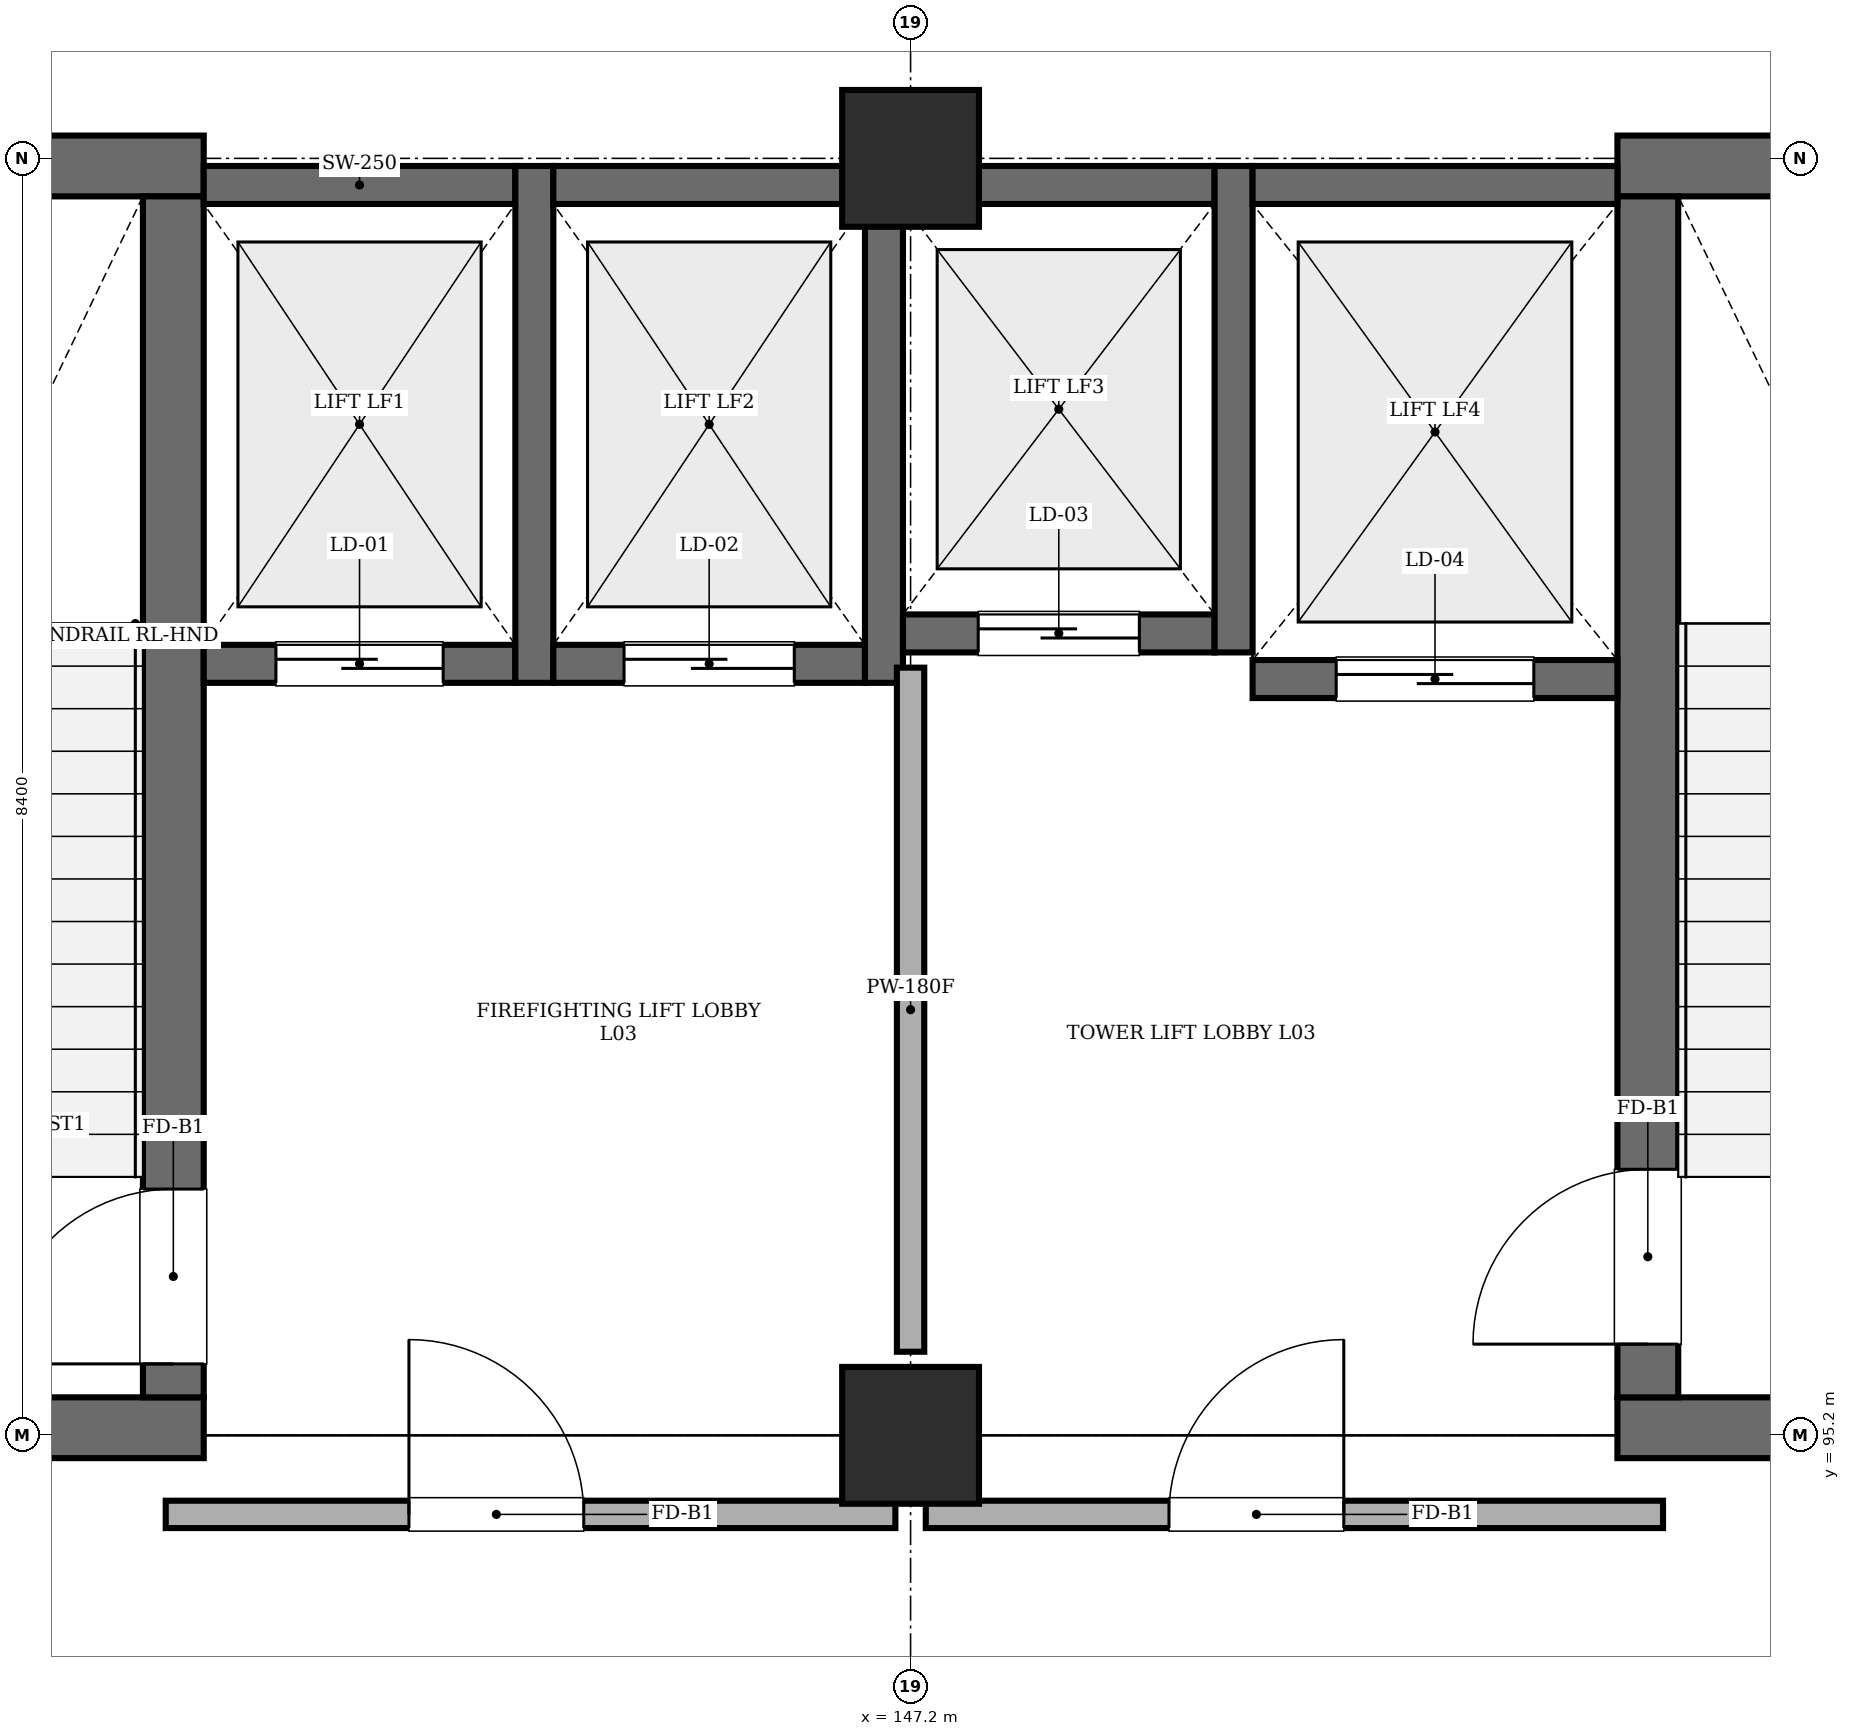
"""IFC4 building model, lengths in metres.
Left out: names, types, materials, properties, quantities, classifications, styles, units other than length and angle.
Written with IfcOpenShell. Run it as: python <this file> out.ifc"""

import sys

from ifc_helpers import new_model, si_unit, direction, frame, frame_2d, origin, origin_2d, place, context, subcontext, project, spatial, rectangle, extrude, element, fill, save


model = new_model("IFC4")
c1 = context("Model", 3, precision=1e-05, world=origin(), true_north=direction((0.0, 1.0)))
c2 = subcontext(c1, "Body", "Model", "MODEL_VIEW")
j1 = project(units=[si_unit("LENGTHUNIT", "METRE"), si_unit("PLANEANGLEUNIT", "RADIAN")], contexts=[c1])
p1 = place(None, origin())
s1 = spatial("IfcSite", under=j1, at=p1, CompositionType="ELEMENT")
p2 = place(p1, origin())
s2 = spatial("IfcBuilding", under=s1, at=p2, CompositionType="ELEMENT")
p3 = place(p2, frame((0.0, 0.0, 10.2)))
s3 = spatial("IfcBuildingStorey", under=s2, at=p3, CompositionType="ELEMENT", Elevation=10.2)
for number, where, z_axis, x_axis in (
    (1, (147.2, 95.2, 0.0), (0.0, 0.0, 1.0), (1.0, 0.0, 0.0)),
    (2, (147.2, 103.6, 0.0), (0.0, 0.0, 1.0), (1.0, 0.0, 0.0)),
):
    element("IfcColumn", number, at=place(p3, frame(where, z_axis=z_axis, x_axis=x_axis)), inside=s3, PredefinedType="COLUMN", context=c2, shape_type="SweptSolid", body=[
        extrude(rectangle(XDim=0.9, YDim=0.9, at=origin_2d()), origin(), (0.0, 0.0, 1.0), 4.26),
    ])
for number, where, z_axis, x_axis in (
    (3, (138.65, 95.25, 0.0), (0.0, 0.0, 1.0), (1.0, 0.0, 0.0)),
    (4, (138.65, 103.55, 0.0), (0.0, 0.0, 1.0), (1.0, 0.0, 0.0)),
):
    element("IfcWall", number, at=place(p3, frame(where, z_axis=z_axis, x_axis=x_axis)), inside=s3, PredefinedType="SHEAR", context=c2, shape_type="SweptSolid", body=[
        extrude(rectangle(XDim=3.9, YDim=0.4, at=frame_2d((1.95, 0.0))), origin(), (0.0, 0.0, 1.0), 4.26),
    ])
p4 = place(p3, frame((142.35, 95.45, 0.0), z_axis=(0.0, 0.0, 1.0), x_axis=(0.0, 1.0, 0.0)))
e5 = element("IfcWall", 5, at=p4, inside=s3, PredefinedType="SHEAR", context=c2, shape_type="SweptSolid", body=[
    extrude(rectangle(XDim=7.9, YDim=0.4, at=frame_2d((3.95, 0.0))), origin(), (0.0, 0.0, 1.0), 4.26),
])
p5 = place(p4, frame((0.22, 0.0, 0.0)))
e6 = element("IfcOpeningElement", 6, at=p5, cuts=e5, PredefinedType="OPENING", context=c2, shape_type="SweptSolid", body=[
    extrude(rectangle(XDim=1.15, YDim=2.15, at=frame_2d((0.575, 1.075))), frame((0.0, 0.21, 0.0), z_axis=(0.0, -1.0, 0.0), x_axis=(1.0, 0.0, 0.0)), (0.0, 0.0, 1.0), 0.42),
])
for number, where, z_axis, x_axis in (
    (7, (151.85, 95.25, 0.0), (0.0, 0.0, 1.0), (1.0, 0.0, 0.0)),
    (8, (151.85, 103.55, 0.0), (0.0, 0.0, 1.0), (1.0, 0.0, 0.0)),
):
    element("IfcWall", number, at=place(p3, frame(where, z_axis=z_axis, x_axis=x_axis)), inside=s3, PredefinedType="SHEAR", context=c2, shape_type="SweptSolid", body=[
        extrude(rectangle(XDim=3.9, YDim=0.4, at=frame_2d((1.95, 0.0))), origin(), (0.0, 0.0, 1.0), 4.26),
    ])
p6 = place(p3, frame((152.05, 95.45, 0.0), z_axis=(0.0, 0.0, 1.0), x_axis=(0.0, 1.0, 0.0)))
e9 = element("IfcWall", 9, at=p6, inside=s3, PredefinedType="SHEAR", context=c2, shape_type="SweptSolid", body=[
    extrude(rectangle(XDim=7.9, YDim=0.4, at=frame_2d((3.95, 0.0))), origin(), (0.0, 0.0, 1.0), 4.26),
])
p7 = place(p6, frame((0.35, 0.0, 0.0)))
e10 = element("IfcOpeningElement", 10, at=p7, cuts=e9, PredefinedType="OPENING", context=c2, shape_type="SweptSolid", body=[
    extrude(rectangle(XDim=1.15, YDim=2.15, at=frame_2d((0.575, 1.075))), frame((0.0, 0.21, 0.0), z_axis=(0.0, -1.0, 0.0), x_axis=(1.0, 0.0, 0.0)), (0.0, 0.0, 1.0), 0.42),
])
p8 = place(p3, frame((142.55, 100.275, 0.0), z_axis=(0.0, 0.0, 1.0), x_axis=(1.0, 0.0, 0.0)))
e11 = element("IfcWall", 11, at=p8, inside=s3, PredefinedType="SHEAR", context=c2, shape_type="SweptSolid", body=[
    extrude(rectangle(XDim=2.05, YDim=0.25, at=frame_2d((1.025, 0.0))), origin(), (0.0, 0.0, 1.0), 4.26),
])
p9 = place(p8, frame((0.475, 0.0, 0.0)))
e12 = element("IfcOpeningElement", 12, at=p9, cuts=e11, PredefinedType="OPENING", context=c2, shape_type="SweptSolid", body=[
    extrude(rectangle(XDim=1.1, YDim=2.15, at=frame_2d((0.55, 1.075))), frame((0.0, 0.135, 0.0), z_axis=(0.0, -1.0, 0.0), x_axis=(1.0, 0.0, 0.0)), (0.0, 0.0, 1.0), 0.27),
])
p10 = place(p3, frame((142.55, 103.425, 0.0), z_axis=(0.0, 0.0, 1.0), x_axis=(1.0, 0.0, 0.0)))
e13 = element("IfcWall", 13, at=p10, inside=s3, PredefinedType="SHEAR", context=c2, shape_type="SweptSolid", body=[
    extrude(rectangle(XDim=2.05, YDim=0.25, at=frame_2d((1.025, 0.0))), origin(), (0.0, 0.0, 1.0), 4.26),
])
p11 = place(p3, frame((144.725, 100.15, 0.0), z_axis=(0.0, 0.0, 1.0), x_axis=(0.0, 1.0, 0.0)))
e14 = element("IfcWall", 14, at=p11, inside=s3, PredefinedType="SHEAR", context=c2, shape_type="SweptSolid", body=[
    extrude(rectangle(XDim=3.4, YDim=0.25, at=frame_2d((1.7, 0.0))), origin(), (0.0, 0.0, 1.0), 4.26),
])
p12 = place(p3, frame((144.85, 100.275, 0.0), z_axis=(0.0, 0.0, 1.0), x_axis=(1.0, 0.0, 0.0)))
e15 = element("IfcWall", 15, at=p12, inside=s3, PredefinedType="SHEAR", context=c2, shape_type="SweptSolid", body=[
    extrude(rectangle(XDim=2.05, YDim=0.25, at=frame_2d((1.025, 0.0))), origin(), (0.0, 0.0, 1.0), 4.26),
])
p13 = place(p12, frame((0.465, 0.0, 0.0)))
e16 = element("IfcOpeningElement", 16, at=p13, cuts=e15, PredefinedType="OPENING", context=c2, shape_type="SweptSolid", body=[
    extrude(rectangle(XDim=1.12, YDim=2.15, at=frame_2d((0.56, 1.075))), frame((0.0, 0.135, 0.0), z_axis=(0.0, -1.0, 0.0), x_axis=(1.0, 0.0, 0.0)), (0.0, 0.0, 1.0), 0.27),
])
p14 = place(p3, frame((144.85, 103.425, 0.0), z_axis=(0.0, 0.0, 1.0), x_axis=(1.0, 0.0, 0.0)))
e17 = element("IfcWall", 17, at=p14, inside=s3, PredefinedType="SHEAR", context=c2, shape_type="SweptSolid", body=[
    extrude(rectangle(XDim=2.05, YDim=0.25, at=frame_2d((1.025, 0.0))), origin(), (0.0, 0.0, 1.0), 4.26),
])
p15 = place(p3, frame((147.025, 100.15, 0.0), z_axis=(0.0, 0.0, 1.0), x_axis=(0.0, 1.0, 0.0)))
e18 = element("IfcWall", 18, at=p15, inside=s3, PredefinedType="SHEAR", context=c2, shape_type="SweptSolid", body=[
    extrude(rectangle(XDim=3.4, YDim=0.25, at=frame_2d((1.7, 0.0))), origin(), (0.0, 0.0, 1.0), 4.26),
])
p16 = place(p3, frame((147.15, 100.475, 0.0), z_axis=(0.0, 0.0, 1.0), x_axis=(1.0, 0.0, 0.0)))
e19 = element("IfcWall", 19, at=p16, inside=s3, PredefinedType="SHEAR", context=c2, shape_type="SweptSolid", body=[
    extrude(rectangle(XDim=2.05, YDim=0.25, at=frame_2d((1.025, 0.0))), origin(), (0.0, 0.0, 1.0), 4.26),
])
p17 = place(p16, frame((0.495, 0.0, 0.0)))
e20 = element("IfcOpeningElement", 20, at=p17, cuts=e19, PredefinedType="OPENING", context=c2, shape_type="SweptSolid", body=[
    extrude(rectangle(XDim=1.06, YDim=2.15, at=frame_2d((0.53, 1.075))), frame((0.0, 0.135, 0.0), z_axis=(0.0, -1.0, 0.0), x_axis=(1.0, 0.0, 0.0)), (0.0, 0.0, 1.0), 0.27),
])
p18 = place(p3, frame((147.15, 103.425, 0.0), z_axis=(0.0, 0.0, 1.0), x_axis=(1.0, 0.0, 0.0)))
e21 = element("IfcWall", 21, at=p18, inside=s3, PredefinedType="SHEAR", context=c2, shape_type="SweptSolid", body=[
    extrude(rectangle(XDim=2.05, YDim=0.25, at=frame_2d((1.025, 0.0))), origin(), (0.0, 0.0, 1.0), 4.26),
])
p19 = place(p3, frame((149.325, 100.35, 0.0), z_axis=(0.0, 0.0, 1.0), x_axis=(0.0, 1.0, 0.0)))
e22 = element("IfcWall", 22, at=p19, inside=s3, PredefinedType="SHEAR", context=c2, shape_type="SweptSolid", body=[
    extrude(rectangle(XDim=3.2, YDim=0.25, at=frame_2d((1.6, 0.0))), origin(), (0.0, 0.0, 1.0), 4.26),
])
p20 = place(p3, frame((149.45, 100.175, 0.0), z_axis=(0.0, 0.0, 1.0), x_axis=(1.0, 0.0, 0.0)))
e23 = element("IfcWall", 23, at=p20, inside=s3, PredefinedType="SHEAR", context=c2, shape_type="SweptSolid", body=[
    extrude(rectangle(XDim=2.4, YDim=0.25, at=frame_2d((1.2, 0.0))), origin(), (0.0, 0.0, 1.0), 4.26),
])
p21 = place(p20, frame((0.55, 0.0, 0.0)))
e24 = element("IfcOpeningElement", 24, at=p21, cuts=e23, PredefinedType="OPENING", context=c2, shape_type="SweptSolid", body=[
    extrude(rectangle(XDim=1.3, YDim=2.25, at=frame_2d((0.65, 1.125))), frame((0.0, 0.135, 0.0), z_axis=(0.0, -1.0, 0.0), x_axis=(1.0, 0.0, 0.0)), (0.0, 0.0, 1.0), 0.27),
])
p22 = place(p3, frame((149.45, 103.425, 0.0), z_axis=(0.0, 0.0, 1.0), x_axis=(1.0, 0.0, 0.0)))
e25 = element("IfcWall", 25, at=p22, inside=s3, PredefinedType="SHEAR", context=c2, shape_type="SweptSolid", body=[
    extrude(rectangle(XDim=2.4, YDim=0.25, at=frame_2d((1.2, 0.0))), origin(), (0.0, 0.0, 1.0), 4.26),
])
p23 = place(p3, frame((142.3, 94.68, 0.0), z_axis=(0.0, 0.0, 1.0), x_axis=(1.0, 0.0, 0.0)))
e26 = element("IfcWall", 26, at=p23, inside=s3, PredefinedType="STANDARD", context=c2, shape_type="SweptSolid", body=[
    extrude(rectangle(XDim=4.8, YDim=0.18, at=frame_2d((2.4, 0.0))), origin(), (0.0, 0.0, 1.0), 4.26),
])
p24 = place(p23, frame((1.6, 0.0, 0.0)))
e27 = element("IfcOpeningElement", 27, at=p24, cuts=e26, PredefinedType="OPENING", context=c2, shape_type="SweptSolid", body=[
    extrude(rectangle(XDim=1.15, YDim=2.15, at=frame_2d((0.575, 1.075))), frame((0.0, 0.1, 0.0), z_axis=(0.0, -1.0, 0.0), x_axis=(1.0, 0.0, 0.0)), (0.0, 0.0, 1.0), 0.2),
])
p25 = place(p3, frame((147.3, 94.68, 0.0), z_axis=(0.0, 0.0, 1.0), x_axis=(1.0, 0.0, 0.0)))
e28 = element("IfcWall", 28, at=p25, inside=s3, PredefinedType="STANDARD", context=c2, shape_type="SweptSolid", body=[
    extrude(rectangle(XDim=4.85, YDim=0.18, at=frame_2d((2.425, 0.0))), origin(), (0.0, 0.0, 1.0), 4.26),
])
p26 = place(p25, frame((1.6, 0.0, 0.0)))
e29 = element("IfcOpeningElement", 29, at=p26, cuts=e28, PredefinedType="OPENING", context=c2, shape_type="SweptSolid", body=[
    extrude(rectangle(XDim=1.15, YDim=2.15, at=frame_2d((0.575, 1.075))), frame((0.0, 0.1, 0.0), z_axis=(0.0, -1.0, 0.0), x_axis=(1.0, 0.0, 0.0)), (0.0, 0.0, 1.0), 0.2),
])
p27 = place(p3, frame((147.2, 95.75, 0.0), z_axis=(0.0, 0.0, 1.0), x_axis=(0.0, 1.0, 0.0)))
e30 = element("IfcWall", 30, at=p27, inside=s3, PredefinedType="STANDARD", context=c2, shape_type="SweptSolid", body=[
    extrude(rectangle(XDim=4.5, YDim=0.18, at=frame_2d((2.25, 0.0))), origin(), (0.0, 0.0, 1.0), 3.51),
])
p28 = place(p24, origin())
e31 = element("IfcDoor", 31, at=p28, inside=s3, OperationType="SINGLE_SWING_LEFT", PredefinedType="DOOR", context=c2, shape_type="SweptSolid", body=[
    extrude(rectangle(XDim=1.15, YDim=2.15, at=frame_2d((0.575, 1.075))), frame((0.0, 0.025, 0.0), z_axis=(0.0, -1.0, 0.0), x_axis=(1.0, 0.0, 0.0)), (0.0, 0.0, 1.0), 0.05),
])
fill(e27, e31)
p29 = place(p26, origin())
e32 = element("IfcDoor", 32, at=p29, inside=s3, OperationType="SINGLE_SWING_RIGHT", PredefinedType="DOOR", context=c2, shape_type="SweptSolid", body=[
    extrude(rectangle(XDim=1.15, YDim=2.15, at=frame_2d((0.575, 1.075))), frame((0.0, 0.025, 0.0), z_axis=(0.0, -1.0, 0.0), x_axis=(1.0, 0.0, 0.0)), (0.0, 0.0, 1.0), 0.05),
])
fill(e29, e32)
p30 = place(p5, origin())
e33 = element("IfcDoor", 33, at=p30, inside=s3, OperationType="SINGLE_SWING_LEFT", PredefinedType="DOOR", context=c2, shape_type="SweptSolid", body=[
    extrude(rectangle(XDim=1.15, YDim=2.15, at=frame_2d((0.575, 1.075))), frame((0.0, 0.025, 0.0), z_axis=(0.0, -1.0, 0.0), x_axis=(1.0, 0.0, 0.0)), (0.0, 0.0, 1.0), 0.05),
])
fill(e6, e33)
p31 = place(p7, origin())
e34 = element("IfcDoor", 34, at=p31, inside=s3, OperationType="SINGLE_SWING_LEFT", PredefinedType="DOOR", context=c2, shape_type="SweptSolid", body=[
    extrude(rectangle(XDim=1.15, YDim=2.15, at=frame_2d((0.575, 1.075))), frame((0.0, 0.025, 0.0), z_axis=(0.0, -1.0, 0.0), x_axis=(1.0, 0.0, 0.0)), (0.0, 0.0, 1.0), 0.05),
])
fill(e10, e34)
p32 = place(p9, origin())
e35 = element("IfcDoor", 35, at=p32, inside=s3, OperationType="SLIDING_TO_LEFT", PredefinedType="DOOR", context=c2, shape_type="SweptSolid", body=[
    extrude(rectangle(XDim=1.1, YDim=2.15, at=frame_2d((0.55, 1.075))), frame((0.0, 0.025, 0.0), z_axis=(0.0, -1.0, 0.0), x_axis=(1.0, 0.0, 0.0)), (0.0, 0.0, 1.0), 0.05),
])
fill(e12, e35)
p33 = place(p13, origin())
e36 = element("IfcDoor", 36, at=p33, inside=s3, OperationType="SLIDING_TO_LEFT", PredefinedType="DOOR", context=c2, shape_type="SweptSolid", body=[
    extrude(rectangle(XDim=1.12, YDim=2.15, at=frame_2d((0.56, 1.075))), frame((0.0, 0.025, 0.0), z_axis=(0.0, -1.0, 0.0), x_axis=(1.0, 0.0, 0.0)), (0.0, 0.0, 1.0), 0.05),
])
fill(e16, e36)
p34 = place(p17, origin())
e37 = element("IfcDoor", 37, at=p34, inside=s3, OperationType="SLIDING_TO_LEFT", PredefinedType="DOOR", context=c2, shape_type="SweptSolid", body=[
    extrude(rectangle(XDim=1.06, YDim=2.15, at=frame_2d((0.53, 1.075))), frame((0.0, 0.025, 0.0), z_axis=(0.0, -1.0, 0.0), x_axis=(1.0, 0.0, 0.0)), (0.0, 0.0, 1.0), 0.05),
])
fill(e20, e37)
p35 = place(p21, origin())
e38 = element("IfcDoor", 38, at=p35, inside=s3, OperationType="SLIDING_TO_LEFT", PredefinedType="DOOR", context=c2, shape_type="SweptSolid", body=[
    extrude(rectangle(XDim=1.3, YDim=2.25, at=frame_2d((0.65, 1.125))), frame((0.0, 0.025, 0.0), z_axis=(0.0, -1.0, 0.0), x_axis=(1.0, 0.0, 0.0)), (0.0, 0.0, 1.0), 0.05),
])
fill(e24, e38)
save(model, sys.argv[1])
